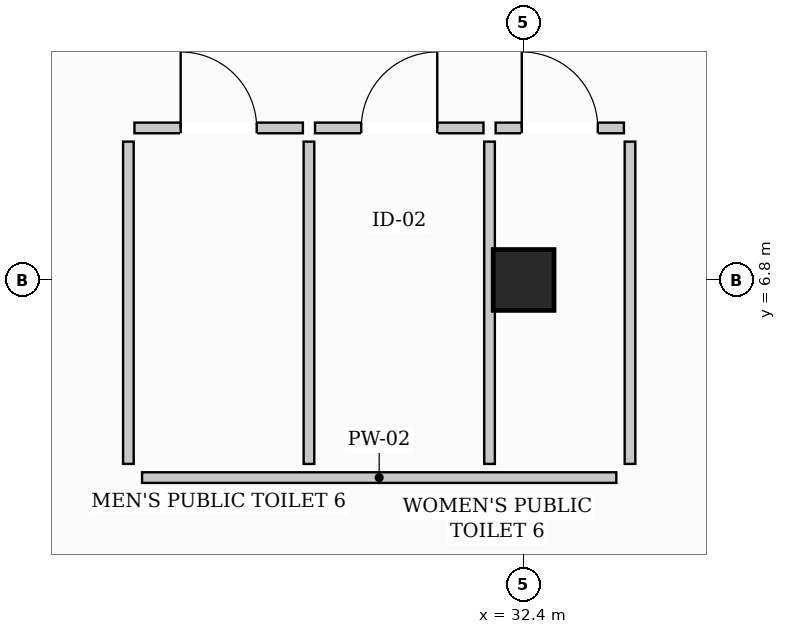
"""IFC4 building model, lengths in metres.
Left out: names, types, materials, properties, quantities, classifications, styles, units other than length and angle.
Written with IfcOpenShell. Run it as: python <this file> out.ifc"""

import sys

from ifc_helpers import new_model, si_unit, direction, frame, frame_2d, origin, origin_2d, place, context, subcontext, project, spatial, rectangle, extrude, element, fill, save


model = new_model("IFC4")
c1 = context("Model", 3, precision=1e-05, world=origin(), true_north=direction((0.0, 1.0)))
c2 = subcontext(c1, "Body", "Model", "MODEL_VIEW")
j1 = project(units=[si_unit("LENGTHUNIT", "METRE"), si_unit("PLANEANGLEUNIT", "RADIAN")], contexts=[c1])
p1 = place(None, origin())
s1 = spatial("IfcSite", under=j1, at=p1, CompositionType="ELEMENT")
p2 = place(p1, origin())
s2 = spatial("IfcBuilding", under=s1, at=p2, CompositionType="ELEMENT")
p3 = place(p2, frame((0.0, 0.0, -4.2)))
s3 = spatial("IfcBuildingStorey", under=s2, at=p3, CompositionType="ELEMENT", Elevation=-4.2)
p4 = place(p3, frame((32.4, 6.8, 0.0), z_axis=(0.0, 0.0, 1.0), x_axis=(1.0, 0.0, 0.0)))
e1 = element("IfcColumn", 1, at=p4, inside=s3, PredefinedType="COLUMN", context=c2, shape_type="SweptSolid", body=[
    extrude(rectangle(XDim=0.8, YDim=0.8, at=origin_2d()), origin(), (0.0, 0.0, 1.0), 4.2),
])
p5 = place(p3, frame((27.38, 4.2, 0.0), z_axis=(0.0, 0.0, 1.0), x_axis=(1.0, 0.0, 0.0)))
e2 = element("IfcWall", 2, at=p5, inside=s3, PredefinedType="PARTITIONING", context=c2, shape_type="SweptSolid", body=[
    extrude(rectangle(XDim=6.24, YDim=0.14, at=frame_2d((3.12, 0.0))), origin(), (0.0, 0.0, 1.0), 2.99),
])
p6 = place(p3, frame((27.2, 4.38, 0.0), z_axis=(0.0, 0.0, 1.0), x_axis=(0.0, 1.0, 0.0)))
e3 = element("IfcWall", 3, at=p6, inside=s3, PredefinedType="PARTITIONING", context=c2, shape_type="SweptSolid", body=[
    extrude(rectangle(XDim=4.24, YDim=0.14, at=frame_2d((2.12, 0.0))), origin(), (0.0, 0.0, 1.0), 3.19),
])
p7 = place(p3, frame((33.8, 4.38, 0.0), z_axis=(0.0, 0.0, 1.0), x_axis=(0.0, 1.0, 0.0)))
e4 = element("IfcWall", 4, at=p7, inside=s3, PredefinedType="PARTITIONING", context=c2, shape_type="SweptSolid", body=[
    extrude(rectangle(XDim=4.24, YDim=0.14, at=frame_2d((2.12, 0.0))), origin(), (0.0, 0.0, 1.0), 3.24),
])
for number, where, z_axis, x_axis in (
    (5, (29.576, 4.38, 0.0), (0.0, 0.0, 1.0), (0.0, 1.0, 0.0)),
    (6, (31.952, 4.38, 0.0), (0.0, 0.0, 1.0), (0.0, 1.0, 0.0)),
):
    element("IfcWall", number, at=place(p3, frame(where, z_axis=z_axis, x_axis=x_axis)), inside=s3, PredefinedType="PARTITIONING", context=c2, shape_type="SweptSolid", body=[
        extrude(rectangle(XDim=4.24, YDim=0.14, at=frame_2d((2.12, 0.0))), origin(), (0.0, 0.0, 1.0), 3.19),
    ])
p8 = place(p3, frame((27.28, 8.8, 0.0), z_axis=(0.0, 0.0, 1.0), x_axis=(1.0, 0.0, 0.0)))
e7 = element("IfcWall", 7, at=p8, inside=s3, PredefinedType="PARTITIONING", context=c2, shape_type="SweptSolid", body=[
    extrude(rectangle(XDim=2.216, YDim=0.14, at=frame_2d((1.108, 0.0))), origin(), (0.0, 0.0, 1.0), 3.48),
])
p9 = place(p8, frame((0.608, 0.0, 0.0)))
e8 = element("IfcOpeningElement", 8, at=p9, cuts=e7, PredefinedType="OPENING", context=c2, shape_type="SweptSolid", body=[
    extrude(rectangle(XDim=1.0, YDim=2.15, at=frame_2d((0.5, 1.075))), frame((0.0, 0.08, 0.0), z_axis=(0.0, -1.0, 0.0), x_axis=(1.0, 0.0, 0.0)), (0.0, 0.0, 1.0), 0.16),
])
p10 = place(p3, frame((29.656, 8.8, 0.0), z_axis=(0.0, 0.0, 1.0), x_axis=(1.0, 0.0, 0.0)))
e9 = element("IfcWall", 9, at=p10, inside=s3, PredefinedType="PARTITIONING", context=c2, shape_type="SweptSolid", body=[
    extrude(rectangle(XDim=2.216, YDim=0.14, at=frame_2d((1.108, 0.0))), origin(), (0.0, 0.0, 1.0), 3.84),
])
p11 = place(p10, frame((0.608, 0.0, 0.0)))
e10 = element("IfcOpeningElement", 10, at=p11, cuts=e9, PredefinedType="OPENING", context=c2, shape_type="SweptSolid", body=[
    extrude(rectangle(XDim=1.0, YDim=2.15, at=frame_2d((0.5, 1.075))), frame((0.0, 0.08, 0.0), z_axis=(0.0, -1.0, 0.0), x_axis=(1.0, 0.0, 0.0)), (0.0, 0.0, 1.0), 0.16),
])
p12 = place(p3, frame((32.032, 8.8, 0.0), z_axis=(0.0, 0.0, 1.0), x_axis=(1.0, 0.0, 0.0)))
e11 = element("IfcWall", 11, at=p12, inside=s3, PredefinedType="PARTITIONING", context=c2, shape_type="SweptSolid", body=[
    extrude(rectangle(XDim=1.688, YDim=0.14, at=frame_2d((0.844, 0.0))), origin(), (0.0, 0.0, 1.0), 3.04),
])
p13 = place(p12, frame((0.344, 0.0, 0.0)))
e12 = element("IfcOpeningElement", 12, at=p13, cuts=e11, PredefinedType="OPENING", context=c2, shape_type="SweptSolid", body=[
    extrude(rectangle(XDim=1.0, YDim=2.15, at=frame_2d((0.5, 1.075))), frame((0.0, 0.08, 0.0), z_axis=(0.0, -1.0, 0.0), x_axis=(1.0, 0.0, 0.0)), (0.0, 0.0, 1.0), 0.16),
])
p14 = place(p9, origin())
e13 = element("IfcDoor", 13, at=p14, inside=s3, OperationType="SINGLE_SWING_LEFT", PredefinedType="DOOR", context=c2, shape_type="SweptSolid", body=[
    extrude(rectangle(XDim=1.0, YDim=2.15, at=frame_2d((0.5, 1.075))), frame((0.0, 0.025, 0.0), z_axis=(0.0, -1.0, 0.0), x_axis=(1.0, 0.0, 0.0)), (0.0, 0.0, 1.0), 0.05),
])
fill(e8, e13)
p15 = place(p11, origin())
e14 = element("IfcDoor", 14, at=p15, inside=s3, OperationType="SINGLE_SWING_RIGHT", PredefinedType="DOOR", context=c2, shape_type="SweptSolid", body=[
    extrude(rectangle(XDim=1.0, YDim=2.15, at=frame_2d((0.5, 1.075))), frame((0.0, 0.025, 0.0), z_axis=(0.0, -1.0, 0.0), x_axis=(1.0, 0.0, 0.0)), (0.0, 0.0, 1.0), 0.05),
])
fill(e10, e14)
p16 = place(p13, origin())
e15 = element("IfcDoor", 15, at=p16, inside=s3, OperationType="SINGLE_SWING_LEFT", PredefinedType="DOOR", context=c2, shape_type="SweptSolid", body=[
    extrude(rectangle(XDim=1.0, YDim=2.15, at=frame_2d((0.5, 1.075))), frame((0.0, 0.025, 0.0), z_axis=(0.0, -1.0, 0.0), x_axis=(1.0, 0.0, 0.0)), (0.0, 0.0, 1.0), 0.05),
])
fill(e12, e15)
save(model, sys.argv[1])
